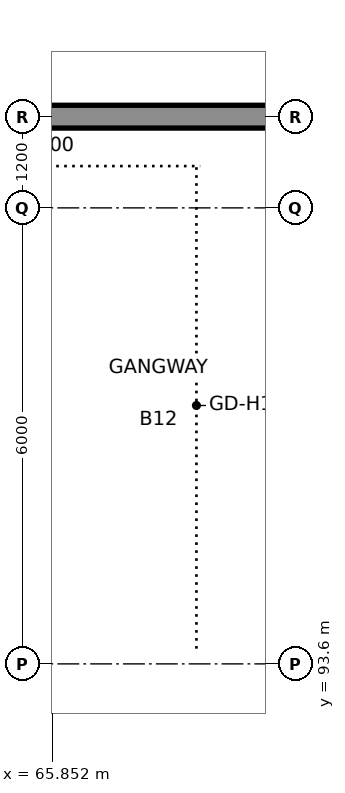
"""IFC4 building model, lengths in metres.
Left out: names, types, materials, properties, quantities, classifications, styles, units other than length and angle.
Written with IfcOpenShell. Run it as: python <this file> out.ifc"""

import sys

from ifc_helpers import new_model, si_unit, direction, frame, frame_2d, origin, place, context, subcontext, project, spatial, rectangle, extrude, element, save


model = new_model("IFC4")
c1 = context("Model", 3, precision=1e-05, world=origin(), true_north=direction((0.0, 1.0)))
c2 = subcontext(c1, "Body", "Model", "MODEL_VIEW")
j1 = project(units=[si_unit("LENGTHUNIT", "METRE"), si_unit("PLANEANGLEUNIT", "RADIAN")], contexts=[c1])
p1 = place(None, origin())
s1 = spatial("IfcSite", under=j1, at=p1, CompositionType="ELEMENT")
p2 = place(p1, origin())
s2 = spatial("IfcBuilding", under=s1, at=p2, CompositionType="ELEMENT")
p3 = place(p2, origin())
s3 = spatial("IfcBuildingStorey", under=s2, at=p3, CompositionType="ELEMENT", Elevation=0.0)
p4 = place(p3, frame((50.5, 100.8, 0.0), z_axis=(0.0, 0.0, 1.0), x_axis=(1.0, 0.0, 0.0)))
e1 = element("IfcWall", 1, at=p4, inside=s3, PredefinedType="PARTITIONING", context=c2, shape_type="SweptSolid", body=[
    extrude(rectangle(XDim=20.5, YDim=0.3, at=frame_2d((10.25, 0.0))), origin(), (0.0, 0.0, 1.0), 3.8),
])
save(model, sys.argv[1])
